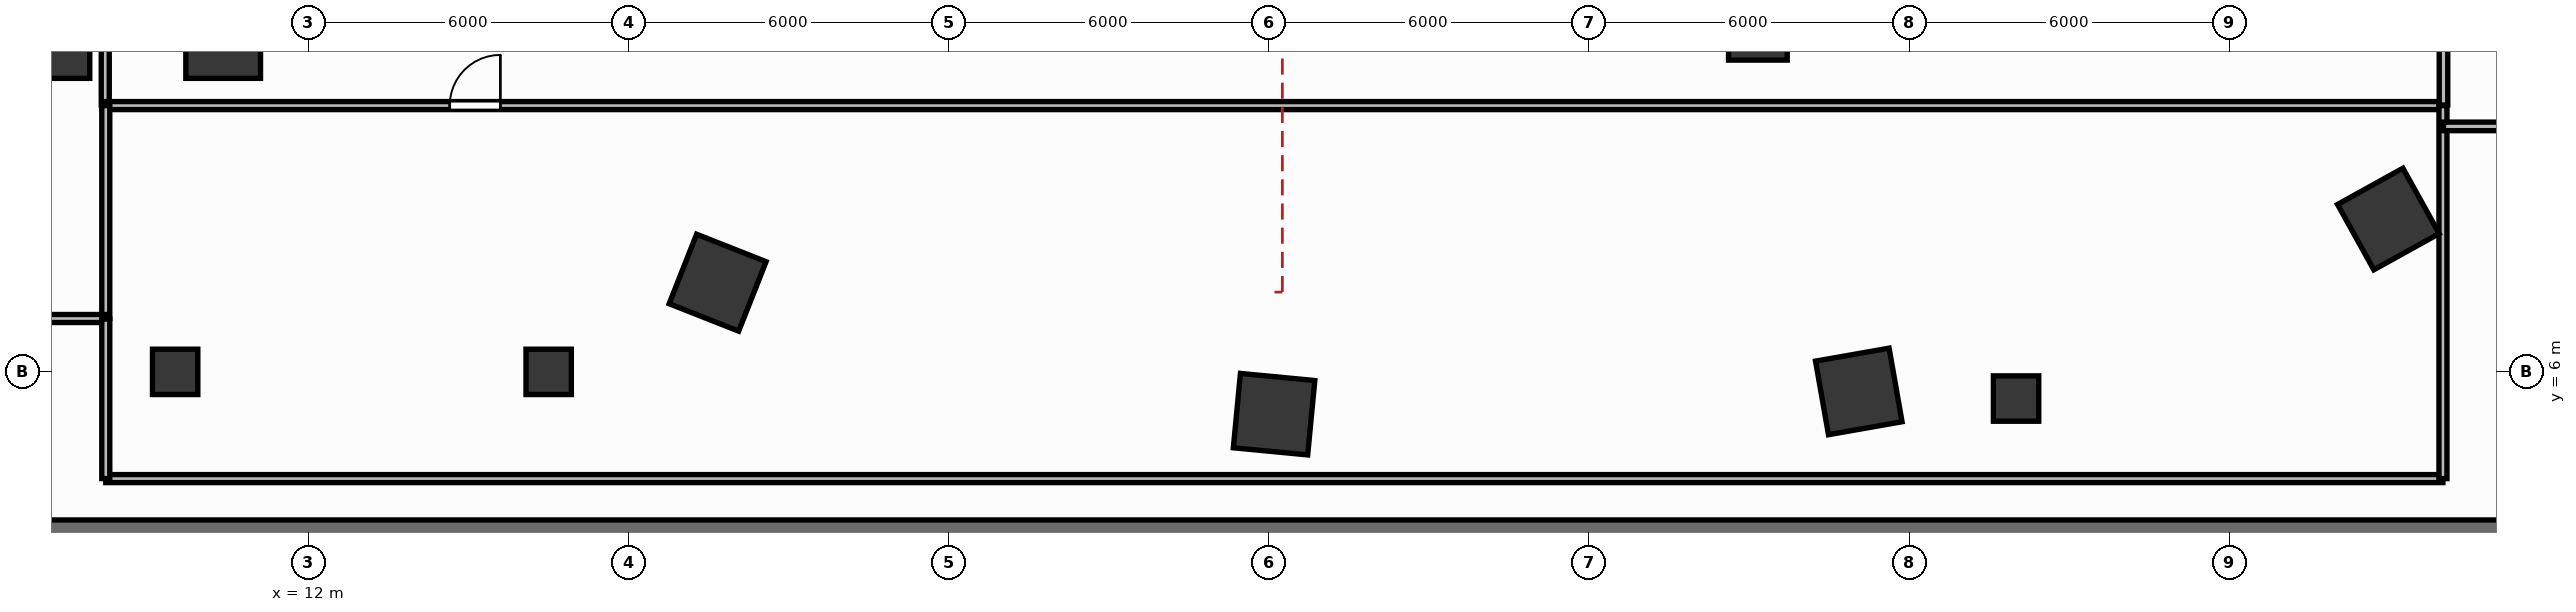
"""IFC4 building model, lengths in metres.
Left out: names, types, materials, properties, quantities, classifications, styles, units other than length and angle.
Written with IfcOpenShell. Run it as: python <this file> out.ifc"""

import sys

from ifc_helpers import new_model, si_unit, direction, frame, frame_2d, origin, origin_2d, place, context, subcontext, project, spatial, rectangle, extrude, element, fill, save


model = new_model("IFC4")
c1 = context("Model", 3, precision=1e-05, world=origin(), true_north=direction((0.0, 1.0)))
c2 = subcontext(c1, "Body", "Model", "MODEL_VIEW")
j1 = project(units=[si_unit("LENGTHUNIT", "METRE"), si_unit("PLANEANGLEUNIT", "RADIAN")], contexts=[c1])
p1 = place(None, origin())
s1 = spatial("IfcSite", under=j1, at=p1, CompositionType="ELEMENT")
p2 = place(p1, origin())
s2 = spatial("IfcBuilding", under=s1, at=p2, CompositionType="ELEMENT")
p3 = place(p2, frame((0.0, 0.0, -4.5)))
s3 = spatial("IfcBuildingStorey", under=s2, at=p3, CompositionType="ELEMENT", Elevation=-4.5)
p4 = place(p3, frame((64.42, 3.0, 0.0), z_axis=(0.0, 0.0, 1.0), x_axis=(-1.0, 0.0, 0.0)))
e1 = element("IfcWall", 1, at=p4, inside=s3, PredefinedType="USERDEFINED", context=c2, shape_type="SweptSolid", body=[
    extrude(rectangle(XDim=62.17, YDim=0.45, at=frame_2d((31.085, 0.0))), origin(), (0.0, 0.0, 1.0), 4.182),
])
for number, where, z_axis, x_axis in (
    (2, (9.5, 6.0, 0.0), (0.0, 0.0, 1.0), (1.0, 0.0, 0.0)),
    (3, (16.5, 6.0, 0.0), (0.0, 0.0, 1.0), (1.0, 0.0, 0.0)),
    (4, (44.0, 5.5, 0.0), (0.0, 0.0, 1.0), (1.0, 0.0, 0.0)),
):
    element("IfcColumn", number, at=place(p3, frame(where, z_axis=z_axis, x_axis=x_axis)), inside=s3, PredefinedType="COLUMN", context=c2, shape_type="SweptSolid", body=[
        extrude(rectangle(XDim=0.85, YDim=0.85, at=origin_2d()), origin(), (0.0, 0.0, 1.0), 4.18),
    ])
for number, where, z_axis, x_axis in (
    (5, (7.2, 12.2, 0.0), (0.0, 0.0, 1.0), (1.0, 0.0, 0.0)),
    (6, (10.4, 12.2, 0.0), (0.0, 0.0, 1.0), (1.0, 0.0, 0.0)),
    (7, (19.667, 7.671, 0.0), (0.0, 0.0, 1.0), (-0.93, 0.367, 0.0)),
    (8, (30.094, 5.208, 0.0), (0.0, 0.0, 1.0), (-0.995, 0.095, 0.0)),
    (9, (41.052, 5.633, 0.0), (0.0, 0.0, 1.0), (0.985, 0.173, 0.0)),
    (10, (50.977, 8.865, 0.0), (0.0, 0.0, 1.0), (0.875, 0.485, 0.0)),
):
    element("IfcColumn", number, at=place(p3, frame(where, z_axis=z_axis, x_axis=x_axis)), inside=s3, PredefinedType="COLUMN", context=c2, shape_type="SweptSolid", body=[
        extrude(rectangle(XDim=1.4, YDim=1.4, at=origin_2d()), origin(), (0.0, 0.0, 1.0), 4.18),
    ])
p5 = place(p3, frame((39.161, 12.392, 0.0), z_axis=(0.0, 0.0, 1.0), x_axis=(1.0, 0.0, 0.0)))
e11 = element("IfcColumn", 11, at=p5, inside=s3, PredefinedType="COLUMN", context=c2, shape_type="SweptSolid", body=[
    extrude(rectangle(XDim=1.1, YDim=1.1, at=origin_2d()), origin(), (0.0, 0.0, 1.0), 4.18),
])
p6 = place(p3, frame((8.19, 42.0, 0.0), z_axis=(0.0, 0.0, 1.0), x_axis=(0.0, -1.0, 0.0)))
e12 = element("IfcWall", 12, at=p6, inside=s3, PredefinedType="PARTITIONING", context=c2, shape_type="SweptSolid", body=[
    extrude(rectangle(XDim=31.0, YDim=0.15, at=frame_2d((15.5, 0.0))), origin(), (0.0, 0.0, 1.0), 3.04),
])
p7 = place(p6, frame((3.681, 0.0, 0.0)))
e13 = element("IfcOpeningElement", 13, at=p7, cuts=e12, PredefinedType="OPENING", context=c2, shape_type="SweptSolid", body=[
    extrude(rectangle(XDim=0.95, YDim=2.15, at=frame_2d((0.475, 1.075))), frame((0.0, 0.09, 0.0), z_axis=(0.0, -1.0, 0.0), x_axis=(1.0, 0.0, 0.0)), (0.0, 0.0, 1.0), 0.18),
])
p8 = place(p3, frame((8.21, 10.99, 0.0), z_axis=(0.0, 0.0, 1.0), x_axis=(1.0, 0.0, 0.0)))
e14 = element("IfcWall", 14, at=p8, inside=s3, PredefinedType="PARTITIONING", context=c2, shape_type="SweptSolid", body=[
    extrude(rectangle(XDim=43.79, YDim=0.15, at=frame_2d((21.895, 0.0))), origin(), (0.0, 0.0, 1.0), 3.04),
])
p9 = place(p8, frame((6.435, 0.0, 0.0)))
e15 = element("IfcOpeningElement", 15, at=p9, cuts=e14, PredefinedType="OPENING", context=c2, shape_type="SweptSolid", body=[
    extrude(rectangle(XDim=0.95, YDim=2.15, at=frame_2d((0.475, 1.075))), frame((0.0, 0.09, 0.0), z_axis=(0.0, -1.0, 0.0), x_axis=(1.0, 0.0, 0.0)), (0.0, 0.0, 1.0), 0.18),
])
p10 = place(p3, frame((52.01, 11.0, 0.0), z_axis=(0.0, 0.0, 1.0), x_axis=(0.0, 1.0, 0.0)))
e16 = element("IfcWall", 16, at=p10, inside=s3, PredefinedType="PARTITIONING", context=c2, shape_type="SweptSolid", body=[
    extrude(rectangle(XDim=6.99, YDim=0.16, at=frame_2d((3.495, 0.0))), origin(), (0.0, 0.0, 1.0), 3.04),
])
p11 = place(p10, frame((1.54, 0.0, 0.0)))
e17 = element("IfcOpeningElement", 17, at=p11, cuts=e16, PredefinedType="OPENING", context=c2, shape_type="SweptSolid", body=[
    extrude(rectangle(XDim=0.95, YDim=2.15, at=frame_2d((0.475, 1.075))), frame((0.0, 0.095, 0.0), z_axis=(0.0, -1.0, 0.0), x_axis=(1.0, 0.0, 0.0)), (0.0, 0.0, 1.0), 0.19),
])
p12 = place(p3, frame((8.2, 10.99, 0.0), z_axis=(0.0, 0.0, 1.0), x_axis=(0.0, -1.0, 0.0)))
e18 = element("IfcWall", 18, at=p12, inside=s3, PredefinedType="PARTITIONING", context=c2, shape_type="SweptSolid", body=[
    extrude(rectangle(XDim=3.99, YDim=0.15, at=frame_2d((1.995, 0.0))), origin(), (0.0, 0.0, 1.0), 3.04),
])
p13 = place(p3, frame((8.2, 7.0, 0.0), z_axis=(0.0, 0.0, 1.0), x_axis=(-1.0, 0.0, 0.0)))
e19 = element("IfcWall", 19, at=p13, inside=s3, PredefinedType="PARTITIONING", context=c2, shape_type="SweptSolid", body=[
    extrude(rectangle(XDim=5.2, YDim=0.15, at=frame_2d((2.6, 0.0))), origin(), (0.0, 0.0, 1.0), 3.04),
])
p14 = place(p3, frame((52.0, 4.0, 0.0), z_axis=(0.0, 0.0, 1.0), x_axis=(-1.0, 0.0, 0.0)))
e20 = element("IfcWall", 20, at=p14, inside=s3, PredefinedType="PARTITIONING", context=c2, shape_type="SweptSolid", body=[
    extrude(rectangle(XDim=43.8, YDim=0.15, at=frame_2d((21.9, 0.0))), origin(), (0.0, 0.0, 1.0), 3.04),
])
p15 = place(p3, frame((8.2, 4.0, 0.0), z_axis=(0.0, 0.0, 1.0), x_axis=(0.0, 1.0, 0.0)))
e21 = element("IfcWall", 21, at=p15, inside=s3, PredefinedType="PARTITIONING", context=c2, shape_type="SweptSolid", body=[
    extrude(rectangle(XDim=2.99, YDim=0.15, at=frame_2d((1.495, 0.0))), origin(), (0.0, 0.0, 1.0), 3.04),
])
p16 = place(p3, frame((52.0, 10.99, 0.0), z_axis=(0.0, 0.0, 1.0), x_axis=(0.0, -1.0, 0.0)))
e22 = element("IfcWall", 22, at=p16, inside=s3, PredefinedType="PARTITIONING", context=c2, shape_type="SweptSolid", body=[
    extrude(rectangle(XDim=6.99, YDim=0.15, at=frame_2d((3.495, 0.0))), origin(), (0.0, 0.0, 1.0), 3.04),
])
p17 = place(p3, frame((63.5, 10.6, 0.0), z_axis=(0.0, 0.0, 1.0), x_axis=(-1.0, 0.0, 0.0)))
e23 = element("IfcWall", 23, at=p17, inside=s3, PredefinedType="PARTITIONING", context=c2, shape_type="SweptSolid", body=[
    extrude(rectangle(XDim=11.49, YDim=0.16, at=frame_2d((5.745, 0.0))), origin(), (0.0, 0.0, 1.0), 3.04),
])
p18 = place(p9, origin())
e24 = element("IfcDoor", 24, at=p18, inside=s3, OperationType="SINGLE_SWING_RIGHT", PredefinedType="DOOR", context=c2, shape_type="SweptSolid", body=[
    extrude(rectangle(XDim=0.95, YDim=2.15, at=frame_2d((0.475, 1.075))), frame((0.0, 0.025, 0.0), z_axis=(0.0, -1.0, 0.0), x_axis=(1.0, 0.0, 0.0)), (0.0, 0.0, 1.0), 0.05),
])
fill(e15, e24)
save(model, sys.argv[1])
